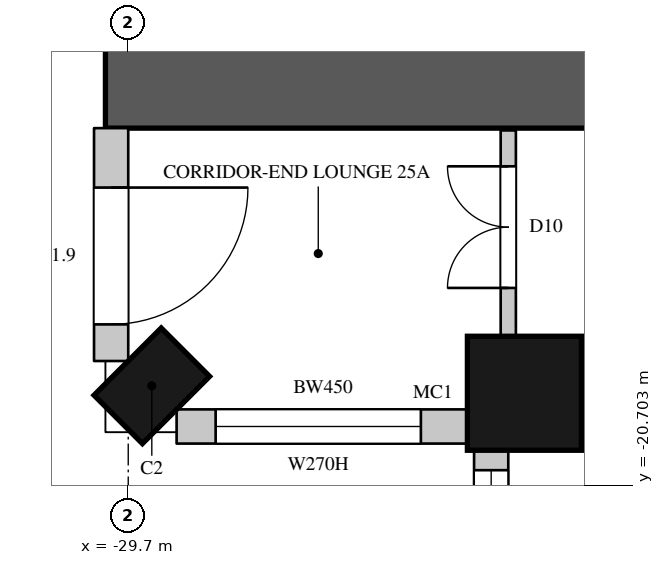
"""IFC4 building model, lengths in metres.
Left out: names, types, materials, properties, quantities, classifications, styles, units other than length and angle.
Written with IfcOpenShell. Run it as: python <this file> out.ifc"""

import sys

from ifc_helpers import new_model, si_unit, direction, frame, frame_2d, origin, origin_2d, place, context, subcontext, project, spatial, rectangle, circle, extrude, element, fill, save


model = new_model("IFC4")
c1 = context("Model", 3, precision=1e-05, world=origin(), true_north=direction((0.0, 1.0)))
c2 = subcontext(c1, "Body", "Model", "MODEL_VIEW")
j1 = project(units=[si_unit("LENGTHUNIT", "METRE"), si_unit("PLANEANGLEUNIT", "RADIAN")], contexts=[c1])
p1 = place(None, origin())
s1 = spatial("IfcSite", under=j1, at=p1, CompositionType="ELEMENT")
p2 = place(p1, origin())
s2 = spatial("IfcBuilding", under=s1, at=p2, CompositionType="ELEMENT")
p3 = place(p2, frame((0.0, 0.0, 120.3)))
s3 = spatial("IfcBuildingStorey", under=s2, at=p3, CompositionType="ELEMENT", Elevation=120.3)
p4 = place(p3, frame((-29.39, -19.39, 0.0), z_axis=(0.0, 0.0, 1.0), x_axis=(0.707106781187, -0.707106781187, 0.0)))
e1 = element("IfcColumn", 1, at=p4, inside=s3, PredefinedType="COLUMN", context=c2, shape_type="SweptSolid", body=[
    extrude(rectangle(XDim=0.9, YDim=1.25, at=origin_2d()), origin(), (0.0, 0.0, 1.0), 3.6),
])
p5 = place(p3, frame((-24.488, -19.488, 0.0), z_axis=(0.0, 0.0, 1.0), x_axis=(1.0, 0.0, 0.0)))
e2 = element("IfcColumn", 2, at=p5, inside=s3, PredefinedType="COLUMN", context=c2, shape_type="SweptSolid", body=[
    extrude(circle(Radius=0.75, at=origin_2d()), origin(), (0.0, 0.0, 1.0), 3.6),
])
p6 = place(p3, frame((-29.925, -16.0, 0.0), z_axis=(0.0, 0.0, 1.0), x_axis=(0.0, -1.0, 0.0)))
e3 = element("IfcWall", 3, at=p6, inside=s3, PredefinedType="SOLIDWALL", context=c2, shape_type="SweptSolid", body=[
    extrude(rectangle(XDim=3.064, YDim=0.45, at=frame_2d((1.532, 0.0))), origin(), (0.0, 0.0, 1.0), 3.3),
])
p7 = place(p6, frame((0.782, 0.0, 0.0)))
e4 = element("IfcOpeningElement", 4, at=p7, cuts=e3, PredefinedType="OPENING", context=c2, shape_type="SweptSolid", body=[
    extrude(rectangle(XDim=1.8, YDim=2.4, at=frame_2d((0.9, 1.2))), frame((0.0, 0.235, 0.0), z_axis=(0.0, -1.0, 0.0), x_axis=(1.0, 0.0, 0.0)), (0.0, 0.0, 1.0), 0.47),
])
p8 = place(p3, frame((-29.064, -19.925, 0.0), z_axis=(0.0, 0.0, 1.0), x_axis=(1.0, 0.0, 0.0)))
e5 = element("IfcWall", 5, at=p8, inside=s3, PredefinedType="SOLIDWALL", context=c2, shape_type="SweptSolid", body=[
    extrude(rectangle(XDim=3.857, YDim=0.45, at=frame_2d((1.928, 0.0))), origin(), (0.0, 0.0, 1.0), 3.3),
])
p9 = place(p8, frame((0.514, 0.0, 1.05)))
e6 = element("IfcOpeningElement", 6, at=p9, cuts=e5, PredefinedType="OPENING", context=c2, shape_type="SweptSolid", body=[
    extrude(rectangle(XDim=2.7, YDim=2.0, at=frame_2d((1.35, 1.0))), frame((0.0, 0.235, 0.0), z_axis=(0.0, -1.0, 0.0), x_axis=(1.0, 0.0, 0.0)), (0.0, 0.0, 1.0), 0.47),
])
p10 = place(p3, frame((-24.925, -20.207, 0.0), z_axis=(0.0, 0.0, 1.0), x_axis=(0.0, -1.0, 0.0)))
e7 = element("IfcWall", 7, at=p10, inside=s3, PredefinedType="SOLIDWALL", context=c2, shape_type="SweptSolid", body=[
    extrude(rectangle(XDim=1.843, YDim=0.45, at=frame_2d((0.921, 0.0))), origin(), (0.0, 0.0, 1.0), 3.3),
])
p11 = place(p10, frame((0.293, 0.0, 1.05)))
e8 = element("IfcOpeningElement", 8, at=p11, cuts=e7, PredefinedType="OPENING", context=c2, shape_type="SweptSolid", body=[
    extrude(rectangle(XDim=1.2, YDim=2.0, at=frame_2d((0.6, 1.0))), frame((0.0, 0.235, 0.0), z_axis=(0.0, -1.0, 0.0), x_axis=(1.0, 0.0, 0.0)), (0.0, 0.0, 1.0), 0.47),
])
p12 = place(p3, frame((-30.0, -15.4, 0.0), z_axis=(0.0, 0.0, 1.0), x_axis=(1.0, 0.0, 0.0)))
e9 = element("IfcWall", 9, at=p12, inside=s3, PredefinedType="SHEAR", context=c2, shape_type="SweptSolid", body=[
    extrude(rectangle(XDim=16.0, YDim=1.2, at=frame_2d((8.0, 0.0))), origin(), (0.0, 0.0, 1.0), 3.6),
])
p13 = place(p12, frame((13.4, 0.0, 0.0)))
e10 = element("IfcOpeningElement", 10, at=p13, cuts=e9, PredefinedType="OPENING", context=c2, shape_type="SweptSolid", body=[
    extrude(rectangle(XDim=1.5, YDim=2.4, at=frame_2d((0.75, 1.2))), frame((0.0, 0.61, 0.0), z_axis=(0.0, -1.0, 0.0), x_axis=(1.0, 0.0, 0.0)), (0.0, 0.0, 1.0), 1.22),
])
p14 = place(p3, frame((-24.7, -18.752, 0.0), z_axis=(0.0, 0.0, 1.0), x_axis=(0.0, 1.0, 0.0)))
e11 = element("IfcWall", 11, at=p14, inside=s3, PredefinedType="PARTITIONING", context=c2, shape_type="SweptSolid", body=[
    extrude(rectangle(XDim=2.722, YDim=0.2, at=frame_2d((1.361, 0.0))), origin(), (0.0, 0.0, 1.0), 3.3),
])
p15 = place(p14, frame((0.65, 0.0, 0.0)))
e12 = element("IfcOpeningElement", 12, at=p15, cuts=e11, PredefinedType="OPENING", context=c2, shape_type="SweptSolid", body=[
    extrude(rectangle(XDim=1.6, YDim=2.4, at=frame_2d((0.8, 1.2))), frame((0.0, 0.11, 0.0), z_axis=(0.0, -1.0, 0.0), x_axis=(1.0, 0.0, 0.0)), (0.0, 0.0, 1.0), 0.22),
])
p16 = place(p3, frame((-23.752, -19.7, 0.0), z_axis=(0.0, 0.0, 1.0), x_axis=(1.0, 0.0, 0.0)))
e13 = element("IfcWall", 13, at=p16, inside=s3, PredefinedType="PARTITIONING", context=c2, shape_type="SweptSolid", body=[
    extrude(rectangle(XDim=3.152, YDim=0.2, at=frame_2d((1.576, 0.0))), origin(), (0.0, 0.0, 1.0), 3.3),
])
p17 = place(p16, frame((1.9, 0.0, 0.0)))
e14 = element("IfcOpeningElement", 14, at=p17, cuts=e13, PredefinedType="OPENING", context=c2, shape_type="SweptSolid", body=[
    extrude(rectangle(XDim=0.95, YDim=2.2, at=frame_2d((0.475, 1.1))), frame((0.0, 0.11, 0.0), z_axis=(0.0, -1.0, 0.0), x_axis=(1.0, 0.0, 0.0)), (0.0, 0.0, 1.0), 0.22),
])
p18 = place(p7, origin())
e15 = element("IfcDoor", 15, at=p18, inside=s3, OperationType="SLIDING_TO_LEFT", PredefinedType="DOOR", context=c2, shape_type="SweptSolid", body=[
    extrude(rectangle(XDim=1.8, YDim=2.4, at=frame_2d((0.9, 1.2))), frame((0.0, 0.13, 0.0), z_axis=(0.0, -1.0, 0.0), x_axis=(1.0, 0.0, 0.0)), (0.0, 0.0, 1.0), 0.05),
])
fill(e4, e15)
p19 = place(p9, origin())
e16 = element("IfcWindow", 16, at=p19, inside=s3, PartitioningType="SINGLE_PANEL", PredefinedType="WINDOW", context=c2, shape_type="SweptSolid", body=[
    extrude(rectangle(XDim=2.7, YDim=2.0, at=frame_2d((1.35, 1.0))), frame((0.0, 0.135, 0.0), z_axis=(0.0, -1.0, 0.0), x_axis=(1.0, 0.0, 0.0)), (0.0, 0.0, 1.0), 0.06),
])
fill(e6, e16)
p20 = place(p11, origin())
e17 = element("IfcWindow", 17, at=p20, inside=s3, PartitioningType="SINGLE_PANEL", PredefinedType="WINDOW", context=c2, shape_type="SweptSolid", body=[
    extrude(rectangle(XDim=1.2, YDim=2.0, at=frame_2d((0.6, 1.0))), frame((0.0, 0.135, 0.0), z_axis=(0.0, -1.0, 0.0), x_axis=(1.0, 0.0, 0.0)), (0.0, 0.0, 1.0), 0.06),
])
fill(e8, e17)
p21 = place(p15, origin())
e18 = element("IfcDoor", 18, at=p21, inside=s3, OperationType="DOUBLE_DOOR_SINGLE_SWING", PredefinedType="DOOR", context=c2, shape_type="SweptSolid", body=[
    extrude(rectangle(XDim=1.6, YDim=2.4, at=frame_2d((0.8, 1.2))), frame((0.0, 0.025, 0.0), z_axis=(0.0, -1.0, 0.0), x_axis=(1.0, 0.0, 0.0)), (0.0, 0.0, 1.0), 0.05),
])
fill(e12, e18)
save(model, sys.argv[1])
